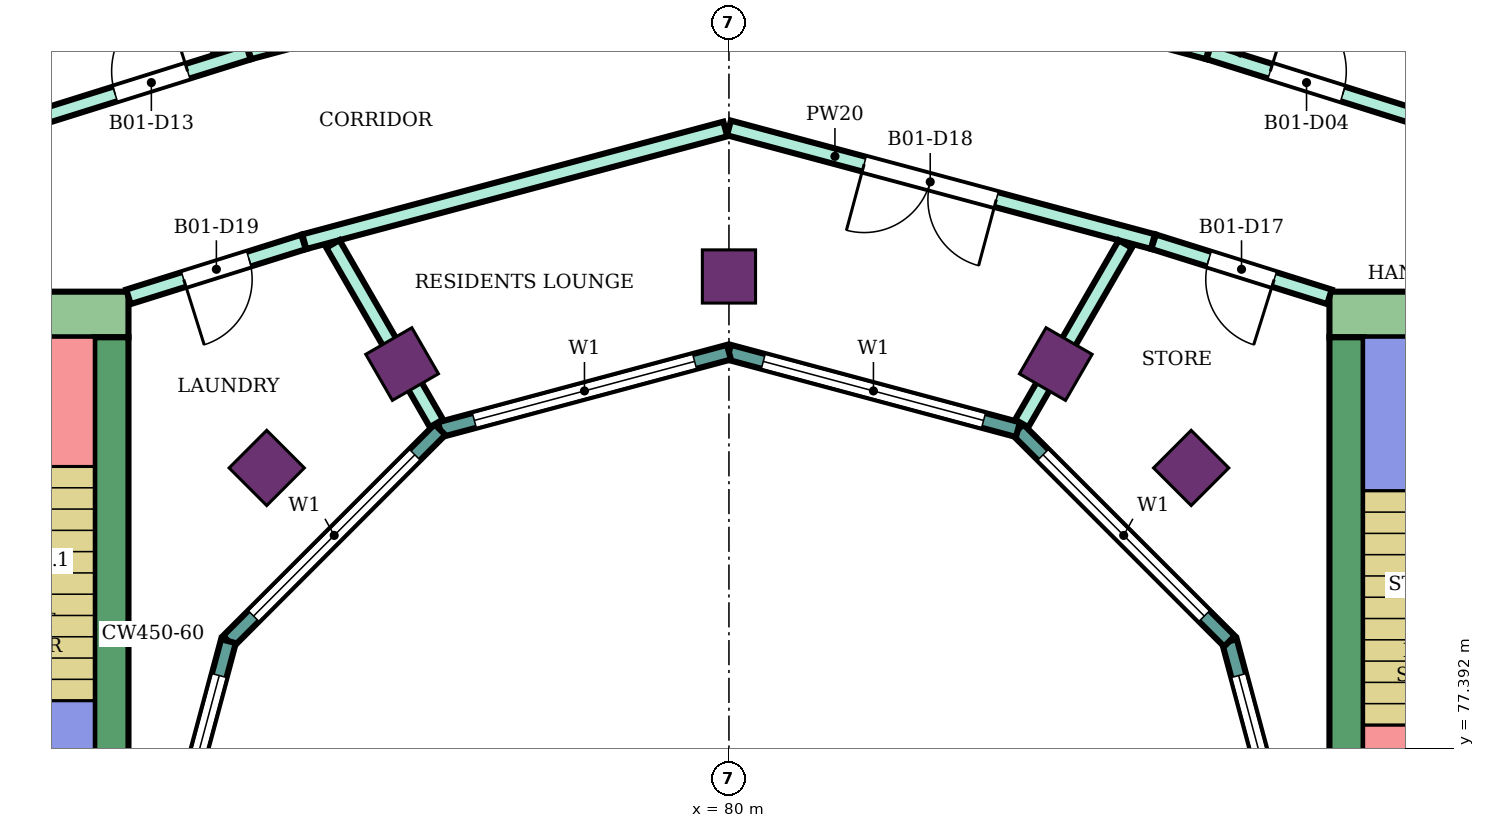
"""IFC4 building model, lengths in metres.
Left out: names, types, materials, properties, quantities, classifications, styles, units other than length and angle.
Written with IfcOpenShell. Run it as: python <this file> out.ifc"""

import sys

from ifc_helpers import new_model, si_unit, direction, frame, frame_2d, origin, origin_2d, place, context, subcontext, project, spatial, rectangle, extrude, element, fill, save


model = new_model("IFC4")
c1 = context("Model", 3, precision=1e-05, world=origin(), true_north=direction((0.0, 1.0)))
c2 = subcontext(c1, "Body", "Model", "MODEL_VIEW")
j1 = project(units=[si_unit("LENGTHUNIT", "METRE"), si_unit("PLANEANGLEUNIT", "RADIAN")], contexts=[c1])
p1 = place(None, origin())
s1 = spatial("IfcSite", under=j1, at=p1, CompositionType="ELEMENT")
p2 = place(p1, origin())
s2 = spatial("IfcBuilding", under=s1, at=p2, CompositionType="ELEMENT")
p3 = place(p2, frame((0.0, 0.0, 212.5)))
s3 = spatial("IfcBuildingStorey", under=s2, at=p3, CompositionType="ELEMENT", Elevation=212.5)
for number, where, z_axis, x_axis in (
    (1, (86.081, 81.081, 0.0), (0.0, 0.0, 1.0), (0.707, 0.707, 0.0)),
    (2, (84.3, 82.448, 0.0), (0.0, 0.0, 1.0), (0.5, 0.866, 0.0)),
    (3, (80.0, 83.6, 0.0), (0.0, 0.0, 1.0), (0.0, 1.0, 0.0)),
    (4, (75.7, 82.448, 0.0), (0.0, 0.0, 1.0), (-0.5, 0.866, 0.0)),
    (5, (73.919, 81.081, 0.0), (0.0, 0.0, 1.0), (-0.707, 0.707, 0.0)),
):
    element("IfcColumn", number, at=place(p3, frame(where, z_axis=z_axis, x_axis=x_axis)), inside=s3, PredefinedType="COLUMN", context=c2, shape_type="SweptSolid", body=[
        extrude(rectangle(XDim=0.7, YDim=0.7, at=origin_2d()), origin(), (0.0, 0.0, 1.0), 4.2),
    ])
p4 = place(p3, frame((87.9, 83.1, 0.0), z_axis=(0.0, 0.0, 1.0), x_axis=(1.0, 0.0, 0.0)))
e6 = element("IfcWall", 6, at=p4, inside=s3, PredefinedType="SHEAR", context=c2, shape_type="SweptSolid", body=[
    extrude(rectangle(XDim=14.9, YDim=0.6, at=frame_2d((7.45, 0.0))), origin(), (0.0, 0.0, 1.0), 3.88),
])
p5 = place(p4, frame((4.2, 0.0, 0.0)))
e7 = element("IfcOpeningElement", 7, at=p5, cuts=e6, PredefinedType="OPENING", context=c2, shape_type="SweptSolid", body=[
    extrude(rectangle(XDim=2.4, YDim=2.4, at=frame_2d((1.2, 1.2))), frame((0.0, 0.31, 0.0), z_axis=(0.0, -1.0, 0.0), x_axis=(1.0, 0.0, 0.0)), (0.0, 0.0, 1.0), 0.62),
])
p6 = place(p3, frame((88.125, 75.0, 0.0), z_axis=(0.0, 0.0, 1.0), x_axis=(0.0, 1.0, 0.0)))
e8 = element("IfcWall", 8, at=p6, inside=s3, PredefinedType="SHEAR", context=c2, shape_type="SweptSolid", body=[
    extrude(rectangle(XDim=7.8, YDim=0.45, at=frame_2d((3.9, 0.0))), origin(), (0.0, 0.0, 1.0), 3.88),
])
p7 = place(p3, frame((72.1, 83.1, 0.0), z_axis=(0.0, 0.0, 1.0), x_axis=(-1.0, 0.0, 0.0)))
e9 = element("IfcWall", 9, at=p7, inside=s3, PredefinedType="SHEAR", context=c2, shape_type="SweptSolid", body=[
    extrude(rectangle(XDim=14.9, YDim=0.6, at=frame_2d((7.45, 0.0))), origin(), (0.0, 0.0, 1.0), 3.88),
])
p8 = place(p7, frame((4.2, 0.0, 0.0)))
e10 = element("IfcOpeningElement", 10, at=p8, cuts=e9, PredefinedType="OPENING", context=c2, shape_type="SweptSolid", body=[
    extrude(rectangle(XDim=2.4, YDim=2.4, at=frame_2d((1.2, 1.2))), frame((0.0, 0.31, 0.0), z_axis=(0.0, -1.0, 0.0), x_axis=(1.0, 0.0, 0.0)), (0.0, 0.0, 1.0), 0.62),
])
p9 = place(p3, frame((71.875, 82.8, 0.0), z_axis=(0.0, 0.0, 1.0), x_axis=(0.0, -1.0, 0.0)))
e11 = element("IfcWall", 11, at=p9, inside=s3, PredefinedType="SHEAR", context=c2, shape_type="SweptSolid", body=[
    extrude(rectangle(XDim=7.8, YDim=0.45, at=frame_2d((3.9, 0.0))), origin(), (0.0, 0.0, 1.0), 3.88),
])
p10 = place(p3, frame((87.604, 75.0, 0.0), z_axis=(0.0, 0.0, 1.0), x_axis=(-0.258789828301, 0.965933654434, 0.0)))
e12 = element("IfcWall", 12, at=p10, inside=s3, PredefinedType="NOTDEFINED", context=c2, shape_type="SweptSolid", body=[
    extrude(rectangle(XDim=3.936, YDim=0.2, at=frame_2d((1.968, 0.0))), origin(), (0.0, 0.0, 1.0), 4.2),
])
p11 = place(p10, frame((0.468, 0.0, 0.9)))
e13 = element("IfcOpeningElement", 13, at=p11, cuts=e12, PredefinedType="OPENING", context=c2, shape_type="SweptSolid", body=[
    extrude(rectangle(XDim=3.0, YDim=2.3, at=frame_2d((1.5, 1.15))), frame((0.0, 0.11, 0.0), z_axis=(0.0, -1.0, 0.0), x_axis=(1.0, 0.0, 0.0)), (0.0, 0.0, 1.0), 0.22),
])
p12 = place(p3, frame((86.585, 78.802, 0.0), z_axis=(0.0, 0.0, 1.0), x_axis=(-0.707106781187, 0.707106781187, 0.0)))
e14 = element("IfcWall", 14, at=p12, inside=s3, PredefinedType="NOTDEFINED", context=c2, shape_type="SweptSolid", body=[
    extrude(rectangle(XDim=3.936, YDim=0.2, at=frame_2d((1.968, 0.0))), origin(), (0.0, 0.0, 1.0), 4.2),
])
p13 = place(p12, frame((0.468, 0.0, 0.9)))
e15 = element("IfcOpeningElement", 15, at=p13, cuts=e14, PredefinedType="OPENING", context=c2, shape_type="SweptSolid", body=[
    extrude(rectangle(XDim=3.0, YDim=2.3, at=frame_2d((1.5, 1.15))), frame((0.0, 0.11, 0.0), z_axis=(0.0, -1.0, 0.0), x_axis=(1.0, 0.0, 0.0)), (0.0, 0.0, 1.0), 0.22),
])
p14 = place(p3, frame((83.802, 81.585, 0.0), z_axis=(0.0, 0.0, 1.0), x_axis=(-0.965933654434, 0.258789828301, 0.0)))
e16 = element("IfcWall", 16, at=p14, inside=s3, PredefinedType="NOTDEFINED", context=c2, shape_type="SweptSolid", body=[
    extrude(rectangle(XDim=3.936, YDim=0.2, at=frame_2d((1.968, 0.0))), origin(), (0.0, 0.0, 1.0), 4.2),
])
p15 = place(p14, frame((0.468, 0.0, 0.9)))
e17 = element("IfcOpeningElement", 17, at=p15, cuts=e16, PredefinedType="OPENING", context=c2, shape_type="SweptSolid", body=[
    extrude(rectangle(XDim=3.0, YDim=2.3, at=frame_2d((1.5, 1.15))), frame((0.0, 0.11, 0.0), z_axis=(0.0, -1.0, 0.0), x_axis=(1.0, 0.0, 0.0)), (0.0, 0.0, 1.0), 0.22),
])
p16 = place(p3, frame((80.0, 82.604, 0.0), z_axis=(0.0, 0.0, 1.0), x_axis=(-0.965933654434, -0.258789828301, 0.0)))
e18 = element("IfcWall", 18, at=p16, inside=s3, PredefinedType="NOTDEFINED", context=c2, shape_type="SweptSolid", body=[
    extrude(rectangle(XDim=3.936, YDim=0.2, at=frame_2d((1.968, 0.0))), origin(), (0.0, 0.0, 1.0), 4.2),
])
p17 = place(p16, frame((0.468, 0.0, 0.9)))
e19 = element("IfcOpeningElement", 19, at=p17, cuts=e18, PredefinedType="OPENING", context=c2, shape_type="SweptSolid", body=[
    extrude(rectangle(XDim=3.0, YDim=2.3, at=frame_2d((1.5, 1.15))), frame((0.0, 0.11, 0.0), z_axis=(0.0, -1.0, 0.0), x_axis=(1.0, 0.0, 0.0)), (0.0, 0.0, 1.0), 0.22),
])
p18 = place(p3, frame((76.198, 81.585, 0.0), z_axis=(0.0, 0.0, 1.0), x_axis=(-0.707106781187, -0.707106781187, 0.0)))
e20 = element("IfcWall", 20, at=p18, inside=s3, PredefinedType="NOTDEFINED", context=c2, shape_type="SweptSolid", body=[
    extrude(rectangle(XDim=3.936, YDim=0.2, at=frame_2d((1.968, 0.0))), origin(), (0.0, 0.0, 1.0), 4.2),
])
p19 = place(p18, frame((0.468, 0.0, 0.9)))
e21 = element("IfcOpeningElement", 21, at=p19, cuts=e20, PredefinedType="OPENING", context=c2, shape_type="SweptSolid", body=[
    extrude(rectangle(XDim=3.0, YDim=2.3, at=frame_2d((1.5, 1.15))), frame((0.0, 0.11, 0.0), z_axis=(0.0, -1.0, 0.0), x_axis=(1.0, 0.0, 0.0)), (0.0, 0.0, 1.0), 0.22),
])
p20 = place(p3, frame((73.415, 78.802, 0.0), z_axis=(0.0, 0.0, 1.0), x_axis=(-0.258789828301, -0.965933654434, 0.0)))
e22 = element("IfcWall", 22, at=p20, inside=s3, PredefinedType="NOTDEFINED", context=c2, shape_type="SweptSolid", body=[
    extrude(rectangle(XDim=3.936, YDim=0.2, at=frame_2d((1.968, 0.0))), origin(), (0.0, 0.0, 1.0), 4.2),
])
p21 = place(p20, frame((0.468, 0.0, 0.9)))
e23 = element("IfcOpeningElement", 23, at=p21, cuts=e22, PredefinedType="OPENING", context=c2, shape_type="SweptSolid", body=[
    extrude(rectangle(XDim=3.0, YDim=2.3, at=frame_2d((1.5, 1.15))), frame((0.0, 0.11, 0.0), z_axis=(0.0, -1.0, 0.0), x_axis=(1.0, 0.0, 0.0)), (0.0, 0.0, 1.0), 0.22),
])
p22 = place(p3, frame((67.105, 97.344, 0.0), z_axis=(0.0, 0.0, 1.0), x_axis=(0.499841888023, -0.866116670534, 0.0)))
e24 = element("IfcWall", 24, at=p22, inside=s3, PredefinedType="PARTITIONING", context=c2, shape_type="SweptSolid", body=[
    extrude(rectangle(XDim=12.446, YDim=0.2, at=frame_2d((6.223, 0.0))), origin(), (0.0, 0.0, 1.0), 3.75),
])
p23 = place(p3, frame((68.2, 84.833, 0.0), z_axis=(0.0, 0.0, 1.0), x_axis=(0.954204109499, 0.299156342762, 0.0)))
e25 = element("IfcWall", 25, at=p23, inside=s3, PredefinedType="PARTITIONING", context=c2, shape_type="SweptSolid", body=[
    extrude(rectangle(XDim=5.74, YDim=0.2, at=frame_2d((2.87, 0.0))), origin(), (0.0, 0.0, 1.0), 3.75),
])
p24 = place(p23, frame((3.903, 0.0, 0.0)))
e26 = element("IfcOpeningElement", 26, at=p24, cuts=e25, PredefinedType="OPENING", context=c2, shape_type="SweptSolid", body=[
    extrude(rectangle(XDim=1.0, YDim=2.1, at=frame_2d((0.5, 1.05))), frame((0.0, 0.11, 0.0), z_axis=(0.0, -1.0, 0.0), x_axis=(1.0, 0.0, 0.0)), (0.0, 0.0, 1.0), 0.22),
])
p25 = place(p3, frame((72.1, 83.332, 0.0), z_axis=(0.0, 0.0, 1.0), x_axis=(0.954233106619, 0.299063836383, 0.0)))
e27 = element("IfcWall", 27, at=p25, inside=s3, PredefinedType="PARTITIONING", context=c2, shape_type="SweptSolid", body=[
    extrude(rectangle(XDim=2.414, YDim=0.2, at=frame_2d((1.207, 0.0))), origin(), (0.0, 0.0, 1.0), 3.75),
])
p26 = place(p25, frame((0.762, 0.0, 0.0)))
e28 = element("IfcOpeningElement", 28, at=p26, cuts=e27, PredefinedType="OPENING", context=c2, shape_type="SweptSolid", body=[
    extrude(rectangle(XDim=0.9, YDim=2.1, at=frame_2d((0.45, 1.05))), frame((0.0, 0.11, 0.0), z_axis=(0.0, -1.0, 0.0), x_axis=(1.0, 0.0, 0.0)), (0.0, 0.0, 1.0), 0.22),
])
p27 = place(p3, frame((73.687, 86.555, 0.0), z_axis=(0.0, 0.0, 1.0), x_axis=(0.966020868517, 0.258464081818, 0.0)))
e29 = element("IfcWall", 29, at=p27, inside=s3, PredefinedType="PARTITIONING", context=c2, shape_type="SweptSolid", body=[
    extrude(rectangle(XDim=6.446, YDim=0.2, at=frame_2d((3.223, 0.0))), origin(), (0.0, 0.0, 1.0), 3.75),
])
p28 = place(p27, frame((5.362, 0.0, 0.0)))
e30 = element("IfcOpeningElement", 30, at=p28, cuts=e29, PredefinedType="OPENING", context=c2, shape_type="SweptSolid", body=[
    extrude(rectangle(XDim=1.0, YDim=2.1, at=frame_2d((0.5, 1.05))), frame((0.0, 0.11, 0.0), z_axis=(0.0, -1.0, 0.0), x_axis=(1.0, 0.0, 0.0)), (0.0, 0.0, 1.0), 0.22),
])
p29 = place(p3, frame((74.413, 84.057, 0.0), z_axis=(0.0, 0.0, 1.0), x_axis=(0.965970849692, 0.258650956976, 0.0)))
e31 = element("IfcWall", 31, at=p29, inside=s3, PredefinedType="PARTITIONING", context=c2, shape_type="SweptSolid", body=[
    extrude(rectangle(XDim=5.734, YDim=0.2, at=frame_2d((2.867, 0.0))), origin(), (0.0, 0.0, 1.0), 3.75),
])
p30 = place(p3, frame((74.79, 84.028, 0.0), z_axis=(0.0, 0.0, 1.0), x_axis=(0.499820708267, -0.866128893172, 0.0)))
e32 = element("IfcWall", 32, at=p30, inside=s3, PredefinedType="PARTITIONING", context=c2, shape_type="SweptSolid", body=[
    extrude(rectangle(XDim=2.725, YDim=0.2, at=frame_2d((1.362, 0.0))), origin(), (0.0, 0.0, 1.0), 3.75),
])
p31 = place(p3, frame((80.0, 85.554, 0.0), z_axis=(0.0, 0.0, 1.0), x_axis=(0.965894438951, -0.258936155845, 0.0)))
e33 = element("IfcWall", 33, at=p31, inside=s3, PredefinedType="PARTITIONING", context=c2, shape_type="SweptSolid", body=[
    extrude(rectangle(XDim=5.774, YDim=0.2, at=frame_2d((2.887, 0.0))), origin(), (0.0, 0.0, 1.0), 3.75),
])
p32 = place(p31, frame((1.841, 0.0, 0.0)))
e34 = element("IfcOpeningElement", 34, at=p32, cuts=e33, PredefinedType="OPENING", context=c2, shape_type="SweptSolid", body=[
    extrude(rectangle(XDim=1.8, YDim=2.1, at=frame_2d((0.9, 1.05))), frame((0.0, 0.11, 0.0), z_axis=(0.0, -1.0, 0.0), x_axis=(1.0, 0.0, 0.0)), (0.0, 0.0, 1.0), 0.22),
])
p33 = place(p3, frame((80.0, 88.246, 0.0), z_axis=(0.0, 0.0, 1.0), x_axis=(0.965866355913, -0.25904088966, 0.0)))
e35 = element("IfcWall", 35, at=p33, inside=s3, PredefinedType="PARTITIONING", context=c2, shape_type="SweptSolid", body=[
    extrude(rectangle(XDim=6.526, YDim=0.2, at=frame_2d((3.263, 0.0))), origin(), (0.0, 0.0, 1.0), 3.75),
])
p34 = place(p3, frame((83.852, 81.667, 0.0), z_axis=(0.0, 0.0, 1.0), x_axis=(0.500138740334, 0.865945287196, 0.0)))
e36 = element("IfcWall", 36, at=p34, inside=s3, PredefinedType="PARTITIONING", context=c2, shape_type="SweptSolid", body=[
    extrude(rectangle(XDim=2.724, YDim=0.2, at=frame_2d((1.362, 0.0))), origin(), (0.0, 0.0, 1.0), 3.75),
])
p35 = place(p3, frame((85.587, 84.057, 0.0), z_axis=(0.0, 0.0, 1.0), x_axis=(0.954239513179, -0.299043393987, 0.0)))
e37 = element("IfcWall", 37, at=p35, inside=s3, PredefinedType="PARTITIONING", context=c2, shape_type="SweptSolid", body=[
    extrude(rectangle(XDim=2.424, YDim=0.2, at=frame_2d((1.212, 0.0))), origin(), (0.0, 0.0, 1.0), 3.75),
])
p36 = place(p35, frame((0.762, 0.0, 0.0)))
e38 = element("IfcOpeningElement", 38, at=p36, cuts=e37, PredefinedType="OPENING", context=c2, shape_type="SweptSolid", body=[
    extrude(rectangle(XDim=0.9, YDim=2.1, at=frame_2d((0.45, 1.05))), frame((0.0, 0.11, 0.0), z_axis=(0.0, -1.0, 0.0), x_axis=(1.0, 0.0, 0.0)), (0.0, 0.0, 1.0), 0.22),
])
p37 = place(p3, frame((86.313, 86.554, 0.0), z_axis=(0.0, 0.0, 1.0), x_axis=(0.954081217458, -0.299548043717, 0.0)))
e39 = element("IfcWall", 39, at=p37, inside=s3, PredefinedType="PARTITIONING", context=c2, shape_type="SweptSolid", body=[
    extrude(rectangle(XDim=5.721, YDim=0.2, at=frame_2d((2.86, 0.0))), origin(), (0.0, 0.0, 1.0), 3.75),
])
p38 = place(p37, frame((0.848, 0.0, 0.0)))
e40 = element("IfcOpeningElement", 40, at=p38, cuts=e39, PredefinedType="OPENING", context=c2, shape_type="SweptSolid", body=[
    extrude(rectangle(XDim=1.0, YDim=2.1, at=frame_2d((0.5, 1.05))), frame((0.0, 0.11, 0.0), z_axis=(0.0, -1.0, 0.0), x_axis=(1.0, 0.0, 0.0)), (0.0, 0.0, 1.0), 0.22),
])
p39 = place(p3, frame((86.671, 86.554, 0.0), z_axis=(0.0, 0.0, 1.0), x_axis=(0.50001992892, 0.866013897511, 0.0)))
e41 = element("IfcWall", 41, at=p39, inside=s3, PredefinedType="PARTITIONING", context=c2, shape_type="SweptSolid", body=[
    extrude(rectangle(XDim=12.456, YDim=0.1, at=frame_2d((6.228, 0.0))), origin(), (0.0, 0.0, 1.0), 3.75),
])
p40 = place(p39, frame((9.215, 0.0, 0.0)))
e42 = element("IfcOpeningElement", 42, at=p40, cuts=e41, PredefinedType="OPENING", context=c2, shape_type="SweptSolid", body=[
    extrude(rectangle(XDim=0.9, YDim=2.1, at=frame_2d((0.45, 1.05))), frame((0.0, 0.06, 0.0), z_axis=(0.0, -1.0, 0.0), x_axis=(1.0, 0.0, 0.0)), (0.0, 0.0, 1.0), 0.12),
])
p41 = place(p39, frame((2.974, 0.0, 0.0)))
e43 = element("IfcOpeningElement", 43, at=p41, cuts=e41, PredefinedType="OPENING", context=c2, shape_type="SweptSolid", body=[
    extrude(rectangle(XDim=0.8, YDim=2.1, at=frame_2d((0.4, 1.05))), frame((0.0, 0.06, 0.0), z_axis=(0.0, -1.0, 0.0), x_axis=(1.0, 0.0, 0.0)), (0.0, 0.0, 1.0), 0.12),
])
p42 = place(p11, origin())
e44 = element("IfcWindow", 44, at=p42, inside=s3, PartitioningType="SINGLE_PANEL", PredefinedType="WINDOW", context=c2, shape_type="SweptSolid", body=[
    extrude(rectangle(XDim=3.0, YDim=2.3, at=frame_2d((1.5, 1.15))), frame((0.0, 0.03, 0.0), z_axis=(0.0, -1.0, 0.0), x_axis=(1.0, 0.0, 0.0)), (0.0, 0.0, 1.0), 0.06),
])
fill(e13, e44)
p43 = place(p13, origin())
e45 = element("IfcWindow", 45, at=p43, inside=s3, PartitioningType="SINGLE_PANEL", PredefinedType="WINDOW", context=c2, shape_type="SweptSolid", body=[
    extrude(rectangle(XDim=3.0, YDim=2.3, at=frame_2d((1.5, 1.15))), frame((0.0, 0.03, 0.0), z_axis=(0.0, -1.0, 0.0), x_axis=(1.0, 0.0, 0.0)), (0.0, 0.0, 1.0), 0.06),
])
fill(e15, e45)
p44 = place(p15, origin())
e46 = element("IfcWindow", 46, at=p44, inside=s3, PartitioningType="SINGLE_PANEL", PredefinedType="WINDOW", context=c2, shape_type="SweptSolid", body=[
    extrude(rectangle(XDim=3.0, YDim=2.3, at=frame_2d((1.5, 1.15))), frame((0.0, 0.03, 0.0), z_axis=(0.0, -1.0, 0.0), x_axis=(1.0, 0.0, 0.0)), (0.0, 0.0, 1.0), 0.06),
])
fill(e17, e46)
p45 = place(p17, origin())
e47 = element("IfcWindow", 47, at=p45, inside=s3, PartitioningType="SINGLE_PANEL", PredefinedType="WINDOW", context=c2, shape_type="SweptSolid", body=[
    extrude(rectangle(XDim=3.0, YDim=2.3, at=frame_2d((1.5, 1.15))), frame((0.0, 0.03, 0.0), z_axis=(0.0, -1.0, 0.0), x_axis=(1.0, 0.0, 0.0)), (0.0, 0.0, 1.0), 0.06),
])
fill(e19, e47)
p46 = place(p19, origin())
e48 = element("IfcWindow", 48, at=p46, inside=s3, PartitioningType="SINGLE_PANEL", PredefinedType="WINDOW", context=c2, shape_type="SweptSolid", body=[
    extrude(rectangle(XDim=3.0, YDim=2.3, at=frame_2d((1.5, 1.15))), frame((0.0, 0.03, 0.0), z_axis=(0.0, -1.0, 0.0), x_axis=(1.0, 0.0, 0.0)), (0.0, 0.0, 1.0), 0.06),
])
fill(e21, e48)
p47 = place(p21, origin())
e49 = element("IfcWindow", 49, at=p47, inside=s3, PartitioningType="SINGLE_PANEL", PredefinedType="WINDOW", context=c2, shape_type="SweptSolid", body=[
    extrude(rectangle(XDim=3.0, YDim=2.3, at=frame_2d((1.5, 1.15))), frame((0.0, 0.03, 0.0), z_axis=(0.0, -1.0, 0.0), x_axis=(1.0, 0.0, 0.0)), (0.0, 0.0, 1.0), 0.06),
])
fill(e23, e49)
p48 = place(p38, origin())
e50 = element("IfcDoor", 50, at=p48, inside=s3, OperationType="SINGLE_SWING_LEFT", PredefinedType="DOOR", context=c2, shape_type="SweptSolid", body=[
    extrude(rectangle(XDim=1.0, YDim=2.1, at=frame_2d((0.5, 1.05))), frame((0.0, 0.025, 0.0), z_axis=(0.0, -1.0, 0.0), x_axis=(1.0, 0.0, 0.0)), (0.0, 0.0, 1.0), 0.05),
])
fill(e40, e50)
p49 = place(p24, origin())
e51 = element("IfcDoor", 51, at=p49, inside=s3, OperationType="SINGLE_SWING_RIGHT", PredefinedType="DOOR", context=c2, shape_type="SweptSolid", body=[
    extrude(rectangle(XDim=1.0, YDim=2.1, at=frame_2d((0.5, 1.05))), frame((0.0, 0.025, 0.0), z_axis=(0.0, -1.0, 0.0), x_axis=(1.0, 0.0, 0.0)), (0.0, 0.0, 1.0), 0.05),
])
fill(e26, e51)
p50 = place(p36, frame((0.9, 0.0, 0.0), z_axis=(0.0, 0.0, 1.0), x_axis=(-1.0, 0.0, 0.0)))
e52 = element("IfcDoor", 52, at=p50, inside=s3, OperationType="SINGLE_SWING_LEFT", PredefinedType="DOOR", context=c2, shape_type="SweptSolid", body=[
    extrude(rectangle(XDim=0.9, YDim=2.1, at=frame_2d((0.45, 1.05))), frame((0.0, 0.025, 0.0), z_axis=(0.0, -1.0, 0.0), x_axis=(1.0, 0.0, 0.0)), (0.0, 0.0, 1.0), 0.05),
])
fill(e38, e52)
p51 = place(p32, frame((1.8, 0.0, 0.0), z_axis=(0.0, 0.0, 1.0), x_axis=(-1.0, 0.0, 0.0)))
e53 = element("IfcDoor", 53, at=p51, inside=s3, OperationType="DOUBLE_DOOR_SINGLE_SWING", PredefinedType="DOOR", context=c2, shape_type="SweptSolid", body=[
    extrude(rectangle(XDim=1.8, YDim=2.1, at=frame_2d((0.9, 1.05))), frame((0.0, 0.025, 0.0), z_axis=(0.0, -1.0, 0.0), x_axis=(1.0, 0.0, 0.0)), (0.0, 0.0, 1.0), 0.05),
])
fill(e34, e53)
p52 = place(p26, frame((0.9, 0.0, 0.0), z_axis=(0.0, 0.0, 1.0), x_axis=(-1.0, 0.0, 0.0)))
e54 = element("IfcDoor", 54, at=p52, inside=s3, OperationType="SINGLE_SWING_RIGHT", PredefinedType="DOOR", context=c2, shape_type="SweptSolid", body=[
    extrude(rectangle(XDim=0.9, YDim=2.1, at=frame_2d((0.45, 1.05))), frame((0.0, 0.025, 0.0), z_axis=(0.0, -1.0, 0.0), x_axis=(1.0, 0.0, 0.0)), (0.0, 0.0, 1.0), 0.05),
])
fill(e28, e54)
save(model, sys.argv[1])
